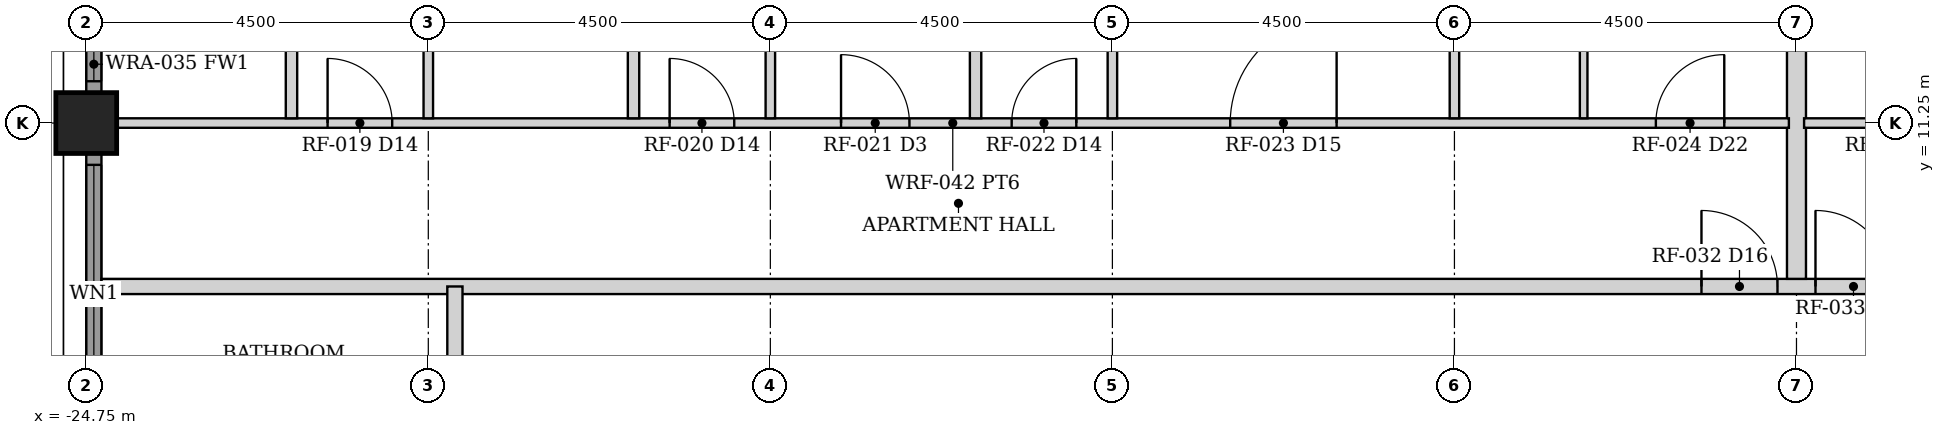
"""IFC4 building model, lengths in metres.
Left out: names, types, materials, properties, quantities, classifications, styles, units other than length and angle.
Written with IfcOpenShell. Run it as: python <this file> out.ifc"""

import sys

from ifc_helpers import new_model, si_unit, direction, frame, frame_2d, origin, origin_2d, place, context, subcontext, project, spatial, rectangle, hollow_rectangle, extrude, element, fill, save


model = new_model("IFC4")
c1 = context("Model", 3, precision=1e-05, world=origin(), true_north=direction((0.0, 1.0)))
c2 = subcontext(c1, "Body", "Model", "MODEL_VIEW")
j1 = project(units=[si_unit("LENGTHUNIT", "METRE"), si_unit("PLANEANGLEUNIT", "RADIAN")], contexts=[c1])
p1 = place(None, origin())
s1 = spatial("IfcSite", under=j1, at=p1, CompositionType="ELEMENT")
p2 = place(p1, origin())
s2 = spatial("IfcBuilding", under=s1, at=p2, CompositionType="ELEMENT")
p3 = place(p2, frame((0.0, 0.0, 79.0)))
s3 = spatial("IfcBuildingStorey", under=s2, at=p3, CompositionType="ELEMENT", Elevation=79.0)
p4 = place(p3, frame((-24.75, 11.25, 0.0), z_axis=(0.0, 0.0, 1.0), x_axis=(1.0, 0.0, 0.0)))
e1 = element("IfcColumn", 1, at=p4, inside=s3, PredefinedType="COLUMN", context=c2, shape_type="SweptSolid", body=[
    extrude(hollow_rectangle(XDim=0.8, YDim=0.8, WallThickness=0.06, at=origin_2d()), origin(), (0.0, 0.0, 1.0), 3.5),
])
p5 = place(p3, frame((-24.65, 7.155, 0.0), z_axis=(0.0, 0.0, 1.0), x_axis=(0.0, 1.0, 0.0)))
e2 = element("IfcWall", 2, at=p5, inside=s3, PredefinedType="SOLIDWALL", context=c2, shape_type="SweptSolid", body=[
    extrude(rectangle(XDim=3.69, YDim=0.2, at=frame_2d((1.845, 0.0))), origin(), (0.0, 0.0, 1.0), 2.379),
])
p6 = place(p5, frame((0.145, 0.0, 0.3)))
e3 = element("IfcOpeningElement", 3, at=p6, cuts=e2, PredefinedType="OPENING", context=c2, shape_type="SweptSolid", body=[
    extrude(rectangle(XDim=3.4, YDim=1.929, at=frame_2d((1.7, 0.964))), frame((0.0, 0.11, 0.0), z_axis=(0.0, -1.0, 0.0), x_axis=(1.0, 0.0, 0.0)), (0.0, 0.0, 1.0), 0.22),
])
p7 = place(p3, frame((-24.65, 11.655, 0.0), z_axis=(0.0, 0.0, 1.0), x_axis=(0.0, 1.0, 0.0)))
e4 = element("IfcWall", 4, at=p7, inside=s3, PredefinedType="SOLIDWALL", context=c2, shape_type="SweptSolid", body=[
    extrude(rectangle(XDim=3.69, YDim=0.2, at=frame_2d((1.845, 0.0))), origin(), (0.0, 0.0, 1.0), 2.379),
])
p8 = place(p7, frame((0.145, 0.0, 0.3)))
e5 = element("IfcOpeningElement", 5, at=p8, cuts=e4, PredefinedType="OPENING", context=c2, shape_type="SweptSolid", body=[
    extrude(rectangle(XDim=3.4, YDim=1.929, at=frame_2d((1.7, 0.964))), frame((0.0, 0.11, 0.0), z_axis=(0.0, -1.0, 0.0), x_axis=(1.0, 0.0, 0.0)), (0.0, 0.0, 1.0), 0.22),
])
p9 = place(p3, frame((-24.55, 9.1, 0.0), z_axis=(0.0, 0.0, 1.0), x_axis=(1.0, 0.0, 0.0)))
e6 = element("IfcWall", 6, at=p9, inside=s3, PredefinedType="PARTITIONING", context=c2, shape_type="SweptSolid", body=[
    extrude(rectangle(XDim=49.1, YDim=0.2, at=frame_2d((24.55, 0.0))), origin(), (0.0, 0.0, 1.0), 2.373),
])
p10 = place(p9, frame((22.55, 0.0, 0.0)))
e7 = element("IfcOpeningElement", 7, at=p10, cuts=e6, PredefinedType="OPENING", context=c2, shape_type="SweptSolid", body=[
    extrude(rectangle(XDim=1.0, YDim=2.3, at=frame_2d((0.5, 1.15))), frame((0.0, 0.11, 0.0), z_axis=(0.0, -1.0, 0.0), x_axis=(1.0, 0.0, 0.0)), (0.0, 0.0, 1.0), 0.22),
])
p11 = place(p9, frame((21.05, 0.0, 0.0)))
e8 = element("IfcOpeningElement", 8, at=p11, cuts=e6, PredefinedType="OPENING", context=c2, shape_type="SweptSolid", body=[
    extrude(rectangle(XDim=1.0, YDim=2.3, at=frame_2d((0.5, 1.15))), frame((0.0, 0.11, 0.0), z_axis=(0.0, -1.0, 0.0), x_axis=(1.0, 0.0, 0.0)), (0.0, 0.0, 1.0), 0.22),
])
p12 = place(p3, frame((-19.9, -9.1, 0.0), z_axis=(0.0, 0.0, 1.0), x_axis=(0.0, 1.0, 0.0)))
e9 = element("IfcWall", 9, at=p12, inside=s3, PredefinedType="PARTITIONING", context=c2, shape_type="SweptSolid", body=[
    extrude(rectangle(XDim=18.2, YDim=0.2, at=frame_2d((9.1, 0.0))), origin(), (0.0, 0.0, 1.0), 2.373),
])
p13 = place(p12, frame((6.35, 0.0, 0.0)))
e10 = element("IfcOpeningElement", 10, at=p13, cuts=e9, PredefinedType="OPENING", context=c2, shape_type="SweptSolid", body=[
    extrude(rectangle(XDim=1.0, YDim=2.3, at=frame_2d((0.5, 1.15))), frame((0.0, 0.11, 0.0), z_axis=(0.0, -1.0, 0.0), x_axis=(1.0, 0.0, 0.0)), (0.0, 0.0, 1.0), 0.22),
])
p14 = place(p3, frame((-2.25, 9.2, 0.0), z_axis=(0.0, 0.0, 1.0), x_axis=(0.0, 1.0, 0.0)))
e11 = element("IfcWall", 11, at=p14, inside=s3, PredefinedType="PARTITIONING", context=c2, shape_type="SweptSolid", body=[
    extrude(rectangle(XDim=15.15, YDim=0.25, at=frame_2d((7.575, 0.0))), origin(), (0.0, 0.0, 1.0), 2.373),
])
p15 = place(p3, frame((-2.15, 11.25, 0.0), z_axis=(0.0, 0.0, 1.0), x_axis=(1.0, 0.0, 0.0)))
e12 = element("IfcWall", 12, at=p15, inside=s3, PredefinedType="PARTITIONING", context=c2, shape_type="SweptSolid", body=[
    extrude(rectangle(XDim=26.5, YDim=0.125, at=frame_2d((13.25, 0.0))), origin(), (0.0, 0.0, 1.0), 2.373),
])
p16 = place(p15, frame((0.85, 0.0, 0.0)))
e13 = element("IfcOpeningElement", 13, at=p16, cuts=e12, PredefinedType="OPENING", context=c2, shape_type="SweptSolid", body=[
    extrude(rectangle(XDim=0.9, YDim=2.1, at=frame_2d((0.45, 1.05))), frame((0.0, 0.073, 0.0), z_axis=(0.0, -1.0, 0.0), x_axis=(1.0, 0.0, 0.0)), (0.0, 0.0, 1.0), 0.145),
])
p17 = place(p15, frame((5.95, 0.0, 0.0)))
e14 = element("IfcOpeningElement", 14, at=p17, cuts=e12, PredefinedType="OPENING", context=c2, shape_type="SweptSolid", body=[
    extrude(rectangle(XDim=1.4, YDim=2.1, at=frame_2d((0.7, 1.05))), frame((0.0, 0.073, 0.0), z_axis=(0.0, -1.0, 0.0), x_axis=(1.0, 0.0, 0.0)), (0.0, 0.0, 1.0), 0.145),
])
p18 = place(p15, frame((9.375, 0.0, 0.0)))
e15 = element("IfcOpeningElement", 15, at=p18, cuts=e12, PredefinedType="OPENING", context=c2, shape_type="SweptSolid", body=[
    extrude(rectangle(XDim=0.85, YDim=2.1, at=frame_2d((0.425, 1.05))), frame((0.0, 0.073, 0.0), z_axis=(0.0, -1.0, 0.0), x_axis=(1.0, 0.0, 0.0)), (0.0, 0.0, 1.0), 0.145),
])
p19 = place(p15, frame((11.57, 0.0, 0.0)))
e16 = element("IfcOpeningElement", 16, at=p19, cuts=e12, PredefinedType="OPENING", context=c2, shape_type="SweptSolid", body=[
    extrude(rectangle(XDim=0.9, YDim=2.1, at=frame_2d((0.45, 1.05))), frame((0.0, 0.073, 0.0), z_axis=(0.0, -1.0, 0.0), x_axis=(1.0, 0.0, 0.0)), (0.0, 0.0, 1.0), 0.145),
])
p20 = place(p15, frame((13.875, 0.0, 0.0)))
e17 = element("IfcOpeningElement", 17, at=p20, cuts=e12, PredefinedType="OPENING", context=c2, shape_type="SweptSolid", body=[
    extrude(rectangle(XDim=0.85, YDim=2.1, at=frame_2d((0.425, 1.05))), frame((0.0, 0.073, 0.0), z_axis=(0.0, -1.0, 0.0), x_axis=(1.0, 0.0, 0.0)), (0.0, 0.0, 1.0), 0.145),
])
p21 = place(p15, frame((18.375, 0.0, 0.0)))
e18 = element("IfcOpeningElement", 18, at=p21, cuts=e12, PredefinedType="OPENING", context=c2, shape_type="SweptSolid", body=[
    extrude(rectangle(XDim=0.85, YDim=2.1, at=frame_2d((0.425, 1.05))), frame((0.0, 0.073, 0.0), z_axis=(0.0, -1.0, 0.0), x_axis=(1.0, 0.0, 0.0)), (0.0, 0.0, 1.0), 0.145),
])
p22 = place(p15, frame((22.875, 0.0, 0.0)))
e19 = element("IfcOpeningElement", 19, at=p22, cuts=e12, PredefinedType="OPENING", context=c2, shape_type="SweptSolid", body=[
    extrude(rectangle(XDim=0.85, YDim=2.1, at=frame_2d((0.425, 1.05))), frame((0.0, 0.073, 0.0), z_axis=(0.0, -1.0, 0.0), x_axis=(1.0, 0.0, 0.0)), (0.0, 0.0, 1.0), 0.145),
])
p23 = place(p3, frame((-24.35, 11.25, 0.0), z_axis=(0.0, 0.0, 1.0), x_axis=(1.0, 0.0, 0.0)))
e20 = element("IfcWall", 20, at=p23, inside=s3, PredefinedType="PARTITIONING", context=c2, shape_type="SweptSolid", body=[
    extrude(rectangle(XDim=22.0, YDim=0.125, at=frame_2d((11.0, 0.0))), origin(), (0.0, 0.0, 1.0), 2.373),
])
p24 = place(p23, frame((20.25, 0.0, 0.0)))
e21 = element("IfcOpeningElement", 21, at=p24, cuts=e20, PredefinedType="OPENING", context=c2, shape_type="SweptSolid", body=[
    extrude(rectangle(XDim=0.9, YDim=2.1, at=frame_2d((0.45, 1.05))), frame((0.0, 0.073, 0.0), z_axis=(0.0, -1.0, 0.0), x_axis=(1.0, 0.0, 0.0)), (0.0, 0.0, 1.0), 0.145),
])
p25 = place(p23, frame((14.65, 0.0, 0.0)))
e22 = element("IfcOpeningElement", 22, at=p25, cuts=e20, PredefinedType="OPENING", context=c2, shape_type="SweptSolid", body=[
    extrude(rectangle(XDim=1.4, YDim=2.1, at=frame_2d((0.7, 1.05))), frame((0.0, 0.073, 0.0), z_axis=(0.0, -1.0, 0.0), x_axis=(1.0, 0.0, 0.0)), (0.0, 0.0, 1.0), 0.145),
])
p26 = place(p23, frame((11.775, 0.0, 0.0)))
e23 = element("IfcOpeningElement", 23, at=p26, cuts=e20, PredefinedType="OPENING", context=c2, shape_type="SweptSolid", body=[
    extrude(rectangle(XDim=0.85, YDim=2.1, at=frame_2d((0.425, 1.05))), frame((0.0, 0.073, 0.0), z_axis=(0.0, -1.0, 0.0), x_axis=(1.0, 0.0, 0.0)), (0.0, 0.0, 1.0), 0.145),
])
p27 = place(p23, frame((9.53, 0.0, 0.0)))
e24 = element("IfcOpeningElement", 24, at=p27, cuts=e20, PredefinedType="OPENING", context=c2, shape_type="SweptSolid", body=[
    extrude(rectangle(XDim=0.9, YDim=2.1, at=frame_2d((0.45, 1.05))), frame((0.0, 0.073, 0.0), z_axis=(0.0, -1.0, 0.0), x_axis=(1.0, 0.0, 0.0)), (0.0, 0.0, 1.0), 0.145),
])
p28 = place(p23, frame((7.275, 0.0, 0.0)))
e25 = element("IfcOpeningElement", 25, at=p28, cuts=e20, PredefinedType="OPENING", context=c2, shape_type="SweptSolid", body=[
    extrude(rectangle(XDim=0.85, YDim=2.1, at=frame_2d((0.425, 1.05))), frame((0.0, 0.073, 0.0), z_axis=(0.0, -1.0, 0.0), x_axis=(1.0, 0.0, 0.0)), (0.0, 0.0, 1.0), 0.145),
])
p29 = place(p23, frame((2.775, 0.0, 0.0)))
e26 = element("IfcOpeningElement", 26, at=p29, cuts=e20, PredefinedType="OPENING", context=c2, shape_type="SweptSolid", body=[
    extrude(rectangle(XDim=0.85, YDim=2.1, at=frame_2d((0.425, 1.05))), frame((0.0, 0.073, 0.0), z_axis=(0.0, -1.0, 0.0), x_axis=(1.0, 0.0, 0.0)), (0.0, 0.0, 1.0), 0.145),
])
p30 = place(p3, frame((-5.05, 11.312, 0.0), z_axis=(0.0, 0.0, 1.0), x_axis=(0.0, 1.0, 0.0)))
e27 = element("IfcWall", 27, at=p30, inside=s3, PredefinedType="PARTITIONING", context=c2, shape_type="SweptSolid", body=[
    extrude(rectangle(XDim=4.05, YDim=0.1, at=frame_2d((2.025, 0.0))), origin(), (0.0, 0.0, 1.0), 2.373),
])
p31 = place(p3, frame((-6.75, 11.312, 0.0), z_axis=(0.0, 0.0, 1.0), x_axis=(0.0, 1.0, 0.0)))
e28 = element("IfcWall", 28, at=p31, inside=s3, PredefinedType="PARTITIONING", context=c2, shape_type="SweptSolid", body=[
    extrude(rectangle(XDim=13.038, YDim=0.125, at=frame_2d((6.519, 0.0))), origin(), (0.0, 0.0, 1.0), 2.373),
])
p32 = place(p31, frame((7.794, 0.0, 0.0)))
e29 = element("IfcOpeningElement", 29, at=p32, cuts=e28, PredefinedType="OPENING", context=c2, shape_type="SweptSolid", body=[
    extrude(rectangle(XDim=1.4, YDim=2.1, at=frame_2d((0.7, 1.05))), frame((0.0, 0.073, 0.0), z_axis=(0.0, -1.0, 0.0), x_axis=(1.0, 0.0, 0.0)), (0.0, 0.0, 1.0), 0.145),
])
p33 = place(p3, frame((-11.25, 11.312, 0.0), z_axis=(0.0, 0.0, 1.0), x_axis=(0.0, 1.0, 0.0)))
e30 = element("IfcWall", 30, at=p33, inside=s3, PredefinedType="PARTITIONING", context=c2, shape_type="SweptSolid", body=[
    extrude(rectangle(XDim=13.038, YDim=0.125, at=frame_2d((6.519, 0.0))), origin(), (0.0, 0.0, 1.0), 2.373),
])
p34 = place(p3, frame((-13.05, 11.312, 0.0), z_axis=(0.0, 0.0, 1.0), x_axis=(0.0, 1.0, 0.0)))
e31 = element("IfcWall", 31, at=p34, inside=s3, PredefinedType="PARTITIONING", context=c2, shape_type="SweptSolid", body=[
    extrude(rectangle(XDim=3.087, YDim=0.15, at=frame_2d((1.544, 0.0))), origin(), (0.0, 0.0, 1.0), 2.373),
])
p35 = place(p34, frame((1.087, 0.0, 0.0)))
e32 = element("IfcOpeningElement", 32, at=p35, cuts=e31, PredefinedType="OPENING", context=c2, shape_type="SweptSolid", body=[
    extrude(rectangle(XDim=0.8, YDim=2.1, at=frame_2d((0.4, 1.05))), frame((0.0, 0.085, 0.0), z_axis=(0.0, -1.0, 0.0), x_axis=(1.0, 0.0, 0.0)), (0.0, 0.0, 1.0), 0.17),
])
p36 = place(p3, frame((-15.75, 11.312, 0.0), z_axis=(0.0, 0.0, 1.0), x_axis=(0.0, 1.0, 0.0)))
e33 = element("IfcWall", 33, at=p36, inside=s3, PredefinedType="PARTITIONING", context=c2, shape_type="SweptSolid", body=[
    extrude(rectangle(XDim=13.038, YDim=0.125, at=frame_2d((6.519, 0.0))), origin(), (0.0, 0.0, 1.0), 2.373),
])
p37 = place(p3, frame((-17.55, 11.312, 0.0), z_axis=(0.0, 0.0, 1.0), x_axis=(0.0, 1.0, 0.0)))
e34 = element("IfcWall", 34, at=p37, inside=s3, PredefinedType="PARTITIONING", context=c2, shape_type="SweptSolid", body=[
    extrude(rectangle(XDim=3.087, YDim=0.15, at=frame_2d((1.544, 0.0))), origin(), (0.0, 0.0, 1.0), 2.373),
])
p38 = place(p37, frame((1.087, 0.0, 0.0)))
e35 = element("IfcOpeningElement", 35, at=p38, cuts=e34, PredefinedType="OPENING", context=c2, shape_type="SweptSolid", body=[
    extrude(rectangle(XDim=0.8, YDim=2.1, at=frame_2d((0.4, 1.05))), frame((0.0, 0.085, 0.0), z_axis=(0.0, -1.0, 0.0), x_axis=(1.0, 0.0, 0.0)), (0.0, 0.0, 1.0), 0.17),
])
p39 = place(p3, frame((-20.25, 11.312, 0.0), z_axis=(0.0, 0.0, 1.0), x_axis=(0.0, 1.0, 0.0)))
e36 = element("IfcWall", 36, at=p39, inside=s3, PredefinedType="PARTITIONING", context=c2, shape_type="SweptSolid", body=[
    extrude(rectangle(XDim=13.038, YDim=0.125, at=frame_2d((6.519, 0.0))), origin(), (0.0, 0.0, 1.0), 2.373),
])
p40 = place(p3, frame((-22.05, 11.312, 0.0), z_axis=(0.0, 0.0, 1.0), x_axis=(0.0, 1.0, 0.0)))
e37 = element("IfcWall", 37, at=p40, inside=s3, PredefinedType="PARTITIONING", context=c2, shape_type="SweptSolid", body=[
    extrude(rectangle(XDim=3.087, YDim=0.15, at=frame_2d((1.544, 0.0))), origin(), (0.0, 0.0, 1.0), 2.373),
])
p41 = place(p40, frame((1.087, 0.0, 0.0)))
e38 = element("IfcOpeningElement", 38, at=p41, cuts=e37, PredefinedType="OPENING", context=c2, shape_type="SweptSolid", body=[
    extrude(rectangle(XDim=0.8, YDim=2.1, at=frame_2d((0.4, 1.05))), frame((0.0, 0.085, 0.0), z_axis=(0.0, -1.0, 0.0), x_axis=(1.0, 0.0, 0.0)), (0.0, 0.0, 1.0), 0.17),
])
p42 = place(p6, origin())
e39 = element("IfcWindow", 39, at=p42, inside=s3, PartitioningType="SINGLE_PANEL", PredefinedType="WINDOW", context=c2, shape_type="SweptSolid", body=[
    extrude(rectangle(XDim=3.4, YDim=1.929, at=frame_2d((1.7, 0.964))), frame((0.0, 0.03, 0.0), z_axis=(0.0, -1.0, 0.0), x_axis=(1.0, 0.0, 0.0)), (0.0, 0.0, 1.0), 0.06),
])
fill(e3, e39)
p43 = place(p8, origin())
e40 = element("IfcWindow", 40, at=p43, inside=s3, PartitioningType="SINGLE_PANEL", PredefinedType="WINDOW", context=c2, shape_type="SweptSolid", body=[
    extrude(rectangle(XDim=3.4, YDim=1.929, at=frame_2d((1.7, 0.964))), frame((0.0, 0.03, 0.0), z_axis=(0.0, -1.0, 0.0), x_axis=(1.0, 0.0, 0.0)), (0.0, 0.0, 1.0), 0.06),
])
fill(e5, e40)
p44 = place(p10, origin())
e41 = element("IfcDoor", 41, at=p44, inside=s3, OperationType="SINGLE_SWING_LEFT", PredefinedType="DOOR", context=c2, shape_type="SweptSolid", body=[
    extrude(rectangle(XDim=1.0, YDim=2.3, at=frame_2d((0.5, 1.15))), frame((0.0, 0.025, 0.0), z_axis=(0.0, -1.0, 0.0), x_axis=(1.0, 0.0, 0.0)), (0.0, 0.0, 1.0), 0.05),
])
fill(e7, e41)
p45 = place(p11, origin())
e42 = element("IfcDoor", 42, at=p45, inside=s3, OperationType="SINGLE_SWING_LEFT", PredefinedType="DOOR", context=c2, shape_type="SweptSolid", body=[
    extrude(rectangle(XDim=1.0, YDim=2.3, at=frame_2d((0.5, 1.15))), frame((0.0, 0.025, 0.0), z_axis=(0.0, -1.0, 0.0), x_axis=(1.0, 0.0, 0.0)), (0.0, 0.0, 1.0), 0.05),
])
fill(e8, e42)
p46 = place(p24, origin())
e43 = element("IfcDoor", 43, at=p46, inside=s3, OperationType="SINGLE_SWING_RIGHT", PredefinedType="DOOR", context=c2, shape_type="SweptSolid", body=[
    extrude(rectangle(XDim=0.9, YDim=2.1, at=frame_2d((0.45, 1.05))), frame((0.0, 0.025, 0.0), z_axis=(0.0, -1.0, 0.0), x_axis=(1.0, 0.0, 0.0)), (0.0, 0.0, 1.0), 0.05),
])
fill(e21, e43)
p47 = place(p25, origin())
e44 = element("IfcDoor", 44, at=p47, inside=s3, OperationType="SINGLE_SWING_RIGHT", PredefinedType="DOOR", context=c2, shape_type="SweptSolid", body=[
    extrude(rectangle(XDim=1.4, YDim=2.1, at=frame_2d((0.7, 1.05))), frame((0.0, 0.025, 0.0), z_axis=(0.0, -1.0, 0.0), x_axis=(1.0, 0.0, 0.0)), (0.0, 0.0, 1.0), 0.05),
])
fill(e22, e44)
p48 = place(p26, origin())
e45 = element("IfcDoor", 45, at=p48, inside=s3, OperationType="SINGLE_SWING_RIGHT", PredefinedType="DOOR", context=c2, shape_type="SweptSolid", body=[
    extrude(rectangle(XDim=0.85, YDim=2.1, at=frame_2d((0.425, 1.05))), frame((0.0, 0.025, 0.0), z_axis=(0.0, -1.0, 0.0), x_axis=(1.0, 0.0, 0.0)), (0.0, 0.0, 1.0), 0.05),
])
fill(e23, e45)
p49 = place(p27, origin())
e46 = element("IfcDoor", 46, at=p49, inside=s3, OperationType="SINGLE_SWING_LEFT", PredefinedType="DOOR", context=c2, shape_type="SweptSolid", body=[
    extrude(rectangle(XDim=0.9, YDim=2.1, at=frame_2d((0.45, 1.05))), frame((0.0, 0.025, 0.0), z_axis=(0.0, -1.0, 0.0), x_axis=(1.0, 0.0, 0.0)), (0.0, 0.0, 1.0), 0.05),
])
fill(e24, e46)
p50 = place(p28, origin())
e47 = element("IfcDoor", 47, at=p50, inside=s3, OperationType="SINGLE_SWING_LEFT", PredefinedType="DOOR", context=c2, shape_type="SweptSolid", body=[
    extrude(rectangle(XDim=0.85, YDim=2.1, at=frame_2d((0.425, 1.05))), frame((0.0, 0.025, 0.0), z_axis=(0.0, -1.0, 0.0), x_axis=(1.0, 0.0, 0.0)), (0.0, 0.0, 1.0), 0.05),
])
fill(e25, e47)
p51 = place(p29, origin())
e48 = element("IfcDoor", 48, at=p51, inside=s3, OperationType="SINGLE_SWING_LEFT", PredefinedType="DOOR", context=c2, shape_type="SweptSolid", body=[
    extrude(rectangle(XDim=0.85, YDim=2.1, at=frame_2d((0.425, 1.05))), frame((0.0, 0.025, 0.0), z_axis=(0.0, -1.0, 0.0), x_axis=(1.0, 0.0, 0.0)), (0.0, 0.0, 1.0), 0.05),
])
fill(e26, e48)
save(model, sys.argv[1])
